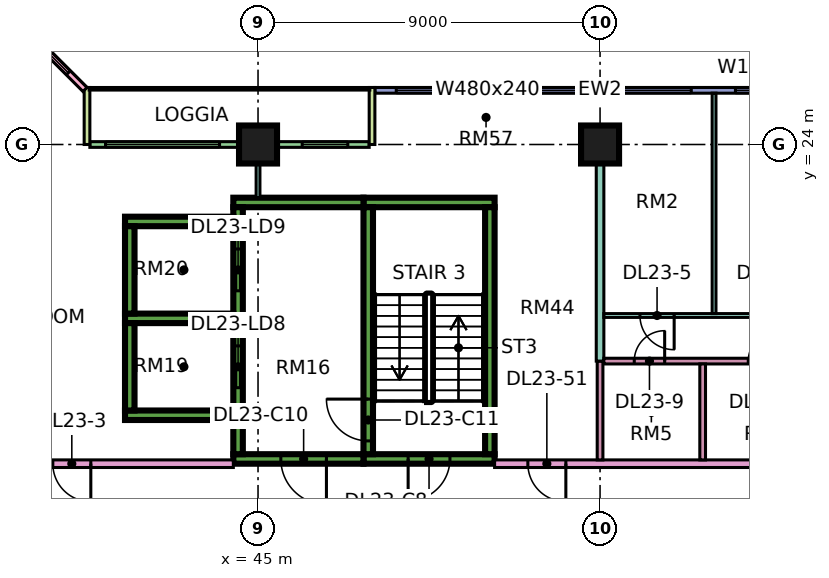
"""IFC4 building model, lengths in metres.
Left out: names, types, materials, properties, quantities, classifications, styles, units other than length and angle.
Written with IfcOpenShell. Run it as: python <this file> out.ifc"""

import sys

from ifc_helpers import new_model, si_unit, direction, frame, frame_2d, origin, origin_2d, place, context, subcontext, project, spatial, rectangle, extrude, element, fill, save


model = new_model("IFC4")
c1 = context("Model", 3, precision=1e-05, world=origin(), true_north=direction((0.0, 1.0)))
c2 = subcontext(c1, "Body", "Model", "MODEL_VIEW")
j1 = project(units=[si_unit("LENGTHUNIT", "METRE"), si_unit("PLANEANGLEUNIT", "RADIAN")], contexts=[c1])
p1 = place(None, origin())
s1 = spatial("IfcSite", under=j1, at=p1, CompositionType="ELEMENT")
p2 = place(p1, origin())
s2 = spatial("IfcBuilding", under=s1, at=p2, CompositionType="ELEMENT")
p3 = place(p2, frame((0.0, 0.0, 103.15)))
s3 = spatial("IfcBuildingStorey", under=s2, at=p3, CompositionType="ELEMENT", Elevation=103.15)
for number, where, z_axis, x_axis in (
    (1, (45.0, 24.0, 0.0), (0.0, 0.0, 1.0), (1.0, 0.0, 0.0)),
    (2, (54.0, 24.0, 0.0), (0.0, 0.0, 1.0), (1.0, 0.0, 0.0)),
):
    element("IfcColumn", number, at=place(p3, frame(where, z_axis=z_axis, x_axis=x_axis)), inside=s3, PredefinedType="COLUMN", context=c2, shape_type="SweptSolid", body=[
        extrude(rectangle(XDim=1.0, YDim=1.0, at=origin_2d()), origin(), (0.0, 0.0, 1.0), 3.75),
    ])
p4 = place(p3, frame((47.775, 15.725, 0.0), z_axis=(0.0, 0.0, 1.0), x_axis=(1.0, 0.0, 0.0)))
e3 = element("IfcWall", 3, at=p4, inside=s3, PredefinedType="SHEAR", context=c2, shape_type="SweptSolid", body=[
    extrude(rectangle(XDim=3.45, YDim=0.25, at=frame_2d((1.725, 0.0))), origin(), (0.0, 0.0, 1.0), 3.75),
])
p5 = place(p4, frame((1.175, 0.0, 0.0)))
e4 = element("IfcOpeningElement", 4, at=p5, cuts=e3, PredefinedType="OPENING", context=c2, shape_type="SweptSolid", body=[
    extrude(rectangle(XDim=1.1, YDim=2.2, at=frame_2d((0.55, 1.1))), frame((0.0, 0.135, 0.0), z_axis=(0.0, -1.0, 0.0), x_axis=(1.0, 0.0, 0.0)), (0.0, 0.0, 1.0), 0.27),
])
p6 = place(p3, frame((47.775, 22.475, 0.0), z_axis=(0.0, 0.0, 1.0), x_axis=(1.0, 0.0, 0.0)))
e5 = element("IfcWall", 5, at=p6, inside=s3, PredefinedType="SHEAR", context=c2, shape_type="SweptSolid", body=[
    extrude(rectangle(XDim=3.45, YDim=0.25, at=frame_2d((1.725, 0.0))), origin(), (0.0, 0.0, 1.0), 3.75),
])
p7 = place(p3, frame((47.9, 15.85, 0.0), z_axis=(0.0, 0.0, 1.0), x_axis=(0.0, 1.0, 0.0)))
e6 = element("IfcWall", 6, at=p7, inside=s3, PredefinedType="SHEAR", context=c2, shape_type="SweptSolid", body=[
    extrude(rectangle(XDim=6.5, YDim=0.25, at=frame_2d((3.25, 0.0))), origin(), (0.0, 0.0, 1.0), 3.75),
])
p8 = place(p7, frame((0.35, 0.0, 0.0)))
e7 = element("IfcOpeningElement", 7, at=p8, cuts=e6, PredefinedType="OPENING", context=c2, shape_type="SweptSolid", body=[
    extrude(rectangle(XDim=1.1, YDim=2.2, at=frame_2d((0.55, 1.1))), frame((0.0, 0.135, 0.0), z_axis=(0.0, -1.0, 0.0), x_axis=(1.0, 0.0, 0.0)), (0.0, 0.0, 1.0), 0.27),
])
p9 = place(p3, frame((51.1, 15.85, 0.0), z_axis=(0.0, 0.0, 1.0), x_axis=(0.0, 1.0, 0.0)))
e8 = element("IfcWall", 8, at=p9, inside=s3, PredefinedType="SHEAR", context=c2, shape_type="SweptSolid", body=[
    extrude(rectangle(XDim=6.5, YDim=0.25, at=frame_2d((3.25, 0.0))), origin(), (0.0, 0.0, 1.0), 3.75),
])
p10 = place(p3, frame((44.35, 15.725, 0.0), z_axis=(0.0, 0.0, 1.0), x_axis=(1.0, 0.0, 0.0)))
e9 = element("IfcWall", 9, at=p10, inside=s3, PredefinedType="SHEAR", context=c2, shape_type="SweptSolid", body=[
    extrude(rectangle(XDim=3.425, YDim=0.25, at=frame_2d((1.712, 0.0))), origin(), (0.0, 0.0, 1.0), 3.75),
])
p11 = place(p10, frame((1.25, 0.0, 0.0)))
e10 = element("IfcOpeningElement", 10, at=p11, cuts=e9, PredefinedType="OPENING", context=c2, shape_type="SweptSolid", body=[
    extrude(rectangle(XDim=1.2, YDim=2.2, at=frame_2d((0.6, 1.1))), frame((0.0, 0.135, 0.0), z_axis=(0.0, -1.0, 0.0), x_axis=(1.0, 0.0, 0.0)), (0.0, 0.0, 1.0), 0.27),
])
p12 = place(p3, frame((44.35, 22.475, 0.0), z_axis=(0.0, 0.0, 1.0), x_axis=(1.0, 0.0, 0.0)))
e11 = element("IfcWall", 11, at=p12, inside=s3, PredefinedType="SHEAR", context=c2, shape_type="SweptSolid", body=[
    extrude(rectangle(XDim=3.425, YDim=0.25, at=frame_2d((1.712, 0.0))), origin(), (0.0, 0.0, 1.0), 3.75),
])
p13 = place(p3, frame((44.475, 15.85, 0.0), z_axis=(0.0, 0.0, 1.0), x_axis=(0.0, 1.0, 0.0)))
e12 = element("IfcWall", 12, at=p13, inside=s3, PredefinedType="SHEAR", context=c2, shape_type="SweptSolid", body=[
    extrude(rectangle(XDim=6.5, YDim=0.25, at=frame_2d((3.25, 0.0))), origin(), (0.0, 0.0, 1.0), 3.75),
])
p14 = place(p13, frame((1.75, 0.0, 0.0)))
e13 = element("IfcOpeningElement", 13, at=p14, cuts=e12, PredefinedType="OPENING", context=c2, shape_type="SweptSolid", body=[
    extrude(rectangle(XDim=1.1, YDim=2.2, at=frame_2d((0.55, 1.1))), frame((0.0, 0.135, 0.0), z_axis=(0.0, -1.0, 0.0), x_axis=(1.0, 0.0, 0.0)), (0.0, 0.0, 1.0), 0.27),
])
p15 = place(p13, frame((4.3, 0.0, 0.0)))
e14 = element("IfcOpeningElement", 14, at=p15, cuts=e12, PredefinedType="OPENING", context=c2, shape_type="SweptSolid", body=[
    extrude(rectangle(XDim=1.1, YDim=2.2, at=frame_2d((0.55, 1.1))), frame((0.0, 0.135, 0.0), z_axis=(0.0, -1.0, 0.0), x_axis=(1.0, 0.0, 0.0)), (0.0, 0.0, 1.0), 0.27),
])
for number, where, z_axis, x_axis in (
    (15, (41.5, 16.875, 0.0), (0.0, 0.0, 1.0), (1.0, 0.0, 0.0)),
    (16, (41.5, 19.425, 0.0), (0.0, 0.0, 1.0), (1.0, 0.0, 0.0)),
    (17, (41.5, 21.975, 0.0), (0.0, 0.0, 1.0), (1.0, 0.0, 0.0)),
):
    element("IfcWall", number, at=place(p3, frame(where, z_axis=z_axis, x_axis=x_axis)), inside=s3, PredefinedType="SHEAR", context=c2, shape_type="SweptSolid", body=[
        extrude(rectangle(XDim=2.85, YDim=0.25, at=frame_2d((1.425, 0.0))), origin(), (0.0, 0.0, 1.0), 3.75),
    ])
for number, where, z_axis, x_axis in (
    (18, (41.625, 17.0, 0.0), (0.0, 0.0, 1.0), (0.0, 1.0, 0.0)),
    (19, (41.625, 19.55, 0.0), (0.0, 0.0, 1.0), (0.0, 1.0, 0.0)),
):
    element("IfcWall", number, at=place(p3, frame(where, z_axis=z_axis, x_axis=x_axis)), inside=s3, PredefinedType="SHEAR", context=c2, shape_type="SweptSolid", body=[
        extrude(rectangle(XDim=2.3, YDim=0.25, at=frame_2d((1.15, 0.0))), origin(), (0.0, 0.0, 1.0), 3.75),
    ])
p16 = place(p3, frame((59.925, 25.425, 0.0), z_axis=(0.0, 0.0, 1.0), x_axis=(-1.0, 0.0, 0.0)))
e20 = element("IfcWall", 20, at=p16, inside=s3, PredefinedType="SOLIDWALL", context=c2, shape_type="SweptSolid", body=[
    extrude(rectangle(XDim=11.85, YDim=0.15, at=frame_2d((5.925, 0.0))), origin(), (0.0, 0.0, 1.0), 3.35),
])
p17 = place(p16, frame((0.562, 0.0, 0.45)))
e21 = element("IfcOpeningElement", 21, at=p17, cuts=e20, PredefinedType="OPENING", context=c2, shape_type="SweptSolid", body=[
    extrude(rectangle(XDim=1.8, YDim=2.4, at=frame_2d((0.9, 1.2))), frame((0.0, 0.085, 0.0), z_axis=(0.0, -1.0, 0.0), x_axis=(1.0, 0.0, 0.0)), (0.0, 0.0, 1.0), 0.17),
])
p18 = place(p16, frame((3.525, 0.0, 0.45)))
e22 = element("IfcOpeningElement", 22, at=p18, cuts=e20, PredefinedType="OPENING", context=c2, shape_type="SweptSolid", body=[
    extrude(rectangle(XDim=1.8, YDim=2.4, at=frame_2d((0.9, 1.2))), frame((0.0, 0.085, 0.0), z_axis=(0.0, -1.0, 0.0), x_axis=(1.0, 0.0, 0.0)), (0.0, 0.0, 1.0), 0.17),
])
p19 = place(p16, frame((6.488, 0.0, 0.45)))
e23 = element("IfcOpeningElement", 23, at=p19, cuts=e20, PredefinedType="OPENING", context=c2, shape_type="SweptSolid", body=[
    extrude(rectangle(XDim=4.8, YDim=2.4, at=frame_2d((2.4, 1.2))), frame((0.0, 0.085, 0.0), z_axis=(0.0, -1.0, 0.0), x_axis=(1.0, 0.0, 0.0)), (0.0, 0.0, 1.0), 0.17),
])
p20 = place(p3, frame((47.925, 24.0, 0.0), z_axis=(0.0, 0.0, 1.0), x_axis=(-1.0, 0.0, 0.0)))
e24 = element("IfcWall", 24, at=p20, inside=s3, PredefinedType="SOLIDWALL", context=c2, shape_type="SweptSolid", body=[
    extrude(rectangle(XDim=7.35, YDim=0.15, at=frame_2d((3.675, 0.0))), origin(), (0.0, 0.0, 1.0), 3.35),
])
p21 = place(p20, frame((0.562, 0.0, 0.45)))
e25 = element("IfcOpeningElement", 25, at=p21, cuts=e24, PredefinedType="OPENING", context=c2, shape_type="SweptSolid", body=[
    extrude(rectangle(XDim=1.2, YDim=2.4, at=frame_2d((0.6, 1.2))), frame((0.0, 0.085, 0.0), z_axis=(0.0, -1.0, 0.0), x_axis=(1.0, 0.0, 0.0)), (0.0, 0.0, 1.0), 0.17),
])
p22 = place(p20, frame((3.938, 0.0, 0.45)))
e26 = element("IfcOpeningElement", 26, at=p22, cuts=e24, PredefinedType="OPENING", context=c2, shape_type="SweptSolid", body=[
    extrude(rectangle(XDim=3.0, YDim=2.4, at=frame_2d((1.5, 1.2))), frame((0.0, 0.085, 0.0), z_axis=(0.0, -1.0, 0.0), x_axis=(1.0, 0.0, 0.0)), (0.0, 0.0, 1.0), 0.17),
])
for number, where, z_axis, x_axis in (
    (27, (48.0, 25.5, 0.0), (0.0, 0.0, 1.0), (0.0, -1.0, 0.0)),
    (28, (40.5, 25.5, 0.0), (0.0, 0.0, 1.0), (0.0, -1.0, 0.0)),
):
    element("IfcWall", number, at=place(p3, frame(where, z_axis=z_axis, x_axis=x_axis)), inside=s3, PredefinedType="SOLIDWALL", context=c2, shape_type="SweptSolid", body=[
        extrude(rectangle(XDim=1.5, YDim=0.15, at=frame_2d((0.75, 0.0))), origin(), (0.0, 0.0, 1.0), 3.35),
    ])
p23 = place(p3, frame((40.447, 25.447, 0.0), z_axis=(0.0, 0.0, 1.0), x_axis=(-0.707106781187, 0.707106781187, 0.0)))
e29 = element("IfcWall", 29, at=p23, inside=s3, PredefinedType="SOLIDWALL", context=c2, shape_type="SweptSolid", body=[
    extrude(rectangle(XDim=4.243, YDim=0.15, at=frame_2d((2.121, 0.0))), origin(), (0.0, 0.0, 1.0), 3.35),
])
p24 = place(p23, frame((0.621, 0.0, 0.45)))
e30 = element("IfcOpeningElement", 30, at=p24, cuts=e29, PredefinedType="OPENING", context=c2, shape_type="SweptSolid", body=[
    extrude(rectangle(XDim=3.0, YDim=2.4, at=frame_2d((1.5, 1.2))), frame((0.0, 0.085, 0.0), z_axis=(0.0, -1.0, 0.0), x_axis=(1.0, 0.0, 0.0)), (0.0, 0.0, 1.0), 0.17),
])
p25 = place(p3, frame((34.0, 15.6, 0.0), z_axis=(0.0, 0.0, 1.0), x_axis=(1.0, 0.0, 0.0)))
e31 = element("IfcWall", 31, at=p25, inside=s3, PredefinedType="PARTITIONING", context=c2, shape_type="SweptSolid", body=[
    extrude(rectangle(XDim=10.35, YDim=0.2, at=frame_2d((5.175, 0.0))), origin(), (0.0, 0.0, 1.0), 3.35),
])
p26 = place(p25, frame((5.6, 0.0, 0.0)))
e32 = element("IfcOpeningElement", 32, at=p26, cuts=e31, PredefinedType="OPENING", context=c2, shape_type="SweptSolid", body=[
    extrude(rectangle(XDim=1.0, YDim=2.1, at=frame_2d((0.5, 1.05))), frame((0.0, 0.11, 0.0), z_axis=(0.0, -1.0, 0.0), x_axis=(1.0, 0.0, 0.0)), (0.0, 0.0, 1.0), 0.22),
])
p27 = place(p25, frame((0.45, 0.0, 0.0)))
e33 = element("IfcOpeningElement", 33, at=p27, cuts=e31, PredefinedType="OPENING", context=c2, shape_type="SweptSolid", body=[
    extrude(rectangle(XDim=1.2, YDim=2.1, at=frame_2d((0.6, 1.05))), frame((0.0, 0.11, 0.0), z_axis=(0.0, -1.0, 0.0), x_axis=(1.0, 0.0, 0.0)), (0.0, 0.0, 1.0), 0.22),
])
p28 = place(p3, frame((45.0, 22.6, 0.0), z_axis=(0.0, 0.0, 1.0), x_axis=(0.0, 1.0, 0.0)))
e34 = element("IfcWall", 34, at=p28, inside=s3, PredefinedType="PARTITIONING", context=c2, shape_type="SweptSolid", body=[
    extrude(rectangle(XDim=1.326, YDim=0.1, at=frame_2d((0.663, 0.0))), origin(), (0.0, 0.0, 1.0), 3.35),
])
p29 = place(p3, frame((51.225, 15.6, 0.0), z_axis=(0.0, 0.0, 1.0), x_axis=(1.0, 0.0, 0.0)))
e35 = element("IfcWall", 35, at=p29, inside=s3, PredefinedType="PARTITIONING", context=c2, shape_type="SweptSolid", body=[
    extrude(rectangle(XDim=20.701, YDim=0.2, at=frame_2d((10.351, 0.0))), origin(), (0.0, 0.0, 1.0), 3.35),
])
p30 = place(p29, frame((18.425, 0.0, 0.0)))
e36 = element("IfcOpeningElement", 36, at=p30, cuts=e35, PredefinedType="OPENING", context=c2, shape_type="SweptSolid", body=[
    extrude(rectangle(XDim=1.0, YDim=2.1, at=frame_2d((0.5, 1.05))), frame((0.0, 0.11, 0.0), z_axis=(0.0, -1.0, 0.0), x_axis=(1.0, 0.0, 0.0)), (0.0, 0.0, 1.0), 0.22),
])
p31 = place(p29, frame((0.875, 0.0, 0.0)))
e37 = element("IfcOpeningElement", 37, at=p31, cuts=e35, PredefinedType="OPENING", context=c2, shape_type="SweptSolid", body=[
    extrude(rectangle(XDim=1.0, YDim=2.1, at=frame_2d((0.5, 1.05))), frame((0.0, 0.11, 0.0), z_axis=(0.0, -1.0, 0.0), x_axis=(1.0, 0.0, 0.0)), (0.0, 0.0, 1.0), 0.22),
])
p32 = place(p3, frame((54.0, 15.7, 0.0), z_axis=(0.0, 0.0, 1.0), x_axis=(0.0, 1.0, 0.0)))
e38 = element("IfcWall", 38, at=p32, inside=s3, PredefinedType="PARTITIONING", context=c2, shape_type="SweptSolid", body=[
    extrude(rectangle(XDim=2.6, YDim=0.15, at=frame_2d((1.3, 0.0))), origin(), (0.0, 0.0, 1.0), 3.35),
])
p33 = place(p3, frame((54.0, 18.3, 0.0), z_axis=(0.0, 0.0, 1.0), x_axis=(0.0, 1.0, 0.0)))
e39 = element("IfcWall", 39, at=p33, inside=s3, PredefinedType="PARTITIONING", context=c2, shape_type="SweptSolid", body=[
    extrude(rectangle(XDim=5.7, YDim=0.2, at=frame_2d((2.85, 0.0))), origin(), (0.0, 0.0, 1.0), 3.35),
])
p34 = place(p3, frame((54.1, 18.3, 0.0), z_axis=(0.0, 0.0, 1.0), x_axis=(1.0, 0.0, 0.0)))
e40 = element("IfcWall", 40, at=p34, inside=s3, PredefinedType="PARTITIONING", context=c2, shape_type="SweptSolid", body=[
    extrude(rectangle(XDim=14.375, YDim=0.15, at=frame_2d((7.188, 0.0))), origin(), (0.0, 0.0, 1.0), 3.35),
])
p35 = place(p34, frame((3.8, 0.0, 0.0)))
e41 = element("IfcOpeningElement", 41, at=p35, cuts=e40, PredefinedType="OPENING", context=c2, shape_type="SweptSolid", body=[
    extrude(rectangle(XDim=0.8, YDim=2.1, at=frame_2d((0.4, 1.05))), frame((0.0, 0.085, 0.0), z_axis=(0.0, -1.0, 0.0), x_axis=(1.0, 0.0, 0.0)), (0.0, 0.0, 1.0), 0.17),
])
p36 = place(p34, frame((10.4, 0.0, 0.0)))
e42 = element("IfcOpeningElement", 42, at=p36, cuts=e40, PredefinedType="OPENING", context=c2, shape_type="SweptSolid", body=[
    extrude(rectangle(XDim=0.9, YDim=2.1, at=frame_2d((0.45, 1.05))), frame((0.0, 0.085, 0.0), z_axis=(0.0, -1.0, 0.0), x_axis=(1.0, 0.0, 0.0)), (0.0, 0.0, 1.0), 0.17),
])
p37 = place(p34, frame((0.8, 0.0, 0.0)))
e43 = element("IfcOpeningElement", 43, at=p37, cuts=e40, PredefinedType="OPENING", context=c2, shape_type="SweptSolid", body=[
    extrude(rectangle(XDim=0.8, YDim=2.1, at=frame_2d((0.4, 1.05))), frame((0.0, 0.085, 0.0), z_axis=(0.0, -1.0, 0.0), x_axis=(1.0, 0.0, 0.0)), (0.0, 0.0, 1.0), 0.17),
])
p38 = place(p34, frame((7.1, 0.0, 0.0)))
e44 = element("IfcOpeningElement", 44, at=p38, cuts=e40, PredefinedType="OPENING", context=c2, shape_type="SweptSolid", body=[
    extrude(rectangle(XDim=0.8, YDim=2.1, at=frame_2d((0.4, 1.05))), frame((0.0, 0.085, 0.0), z_axis=(0.0, -1.0, 0.0), x_axis=(1.0, 0.0, 0.0)), (0.0, 0.0, 1.0), 0.17),
])
p39 = place(p3, frame((54.1, 19.5, 0.0), z_axis=(0.0, 0.0, 1.0), x_axis=(1.0, 0.0, 0.0)))
e45 = element("IfcWall", 45, at=p39, inside=s3, PredefinedType="PARTITIONING", context=c2, shape_type="SweptSolid", body=[
    extrude(rectangle(XDim=5.95, YDim=0.1, at=frame_2d((2.975, 0.0))), origin(), (0.0, 0.0, 1.0), 3.35),
])
p40 = place(p39, frame((0.95, 0.0, 0.0)))
e46 = element("IfcOpeningElement", 46, at=p40, cuts=e45, PredefinedType="OPENING", context=c2, shape_type="SweptSolid", body=[
    extrude(rectangle(XDim=0.9, YDim=2.1, at=frame_2d((0.45, 1.05))), frame((0.0, 0.06, 0.0), z_axis=(0.0, -1.0, 0.0), x_axis=(1.0, 0.0, 0.0)), (0.0, 0.0, 1.0), 0.12),
])
p41 = place(p39, frame((3.95, 0.0, 0.0)))
e47 = element("IfcOpeningElement", 47, at=p41, cuts=e45, PredefinedType="OPENING", context=c2, shape_type="SweptSolid", body=[
    extrude(rectangle(XDim=0.9, YDim=2.1, at=frame_2d((0.45, 1.05))), frame((0.0, 0.06, 0.0), z_axis=(0.0, -1.0, 0.0), x_axis=(1.0, 0.0, 0.0)), (0.0, 0.0, 1.0), 0.12),
])
p42 = place(p3, frame((56.7, 15.7, 0.0), z_axis=(0.0, 0.0, 1.0), x_axis=(0.0, 1.0, 0.0)))
e48 = element("IfcWall", 48, at=p42, inside=s3, PredefinedType="PARTITIONING", context=c2, shape_type="SweptSolid", body=[
    extrude(rectangle(XDim=2.525, YDim=0.15, at=frame_2d((1.263, 0.0))), origin(), (0.0, 0.0, 1.0), 3.35),
])
p43 = place(p3, frame((57.0, 19.55, 0.0), z_axis=(0.0, 0.0, 1.0), x_axis=(0.0, 1.0, 0.0)))
e49 = element("IfcWall", 49, at=p43, inside=s3, PredefinedType="PARTITIONING", context=c2, shape_type="SweptSolid", body=[
    extrude(rectangle(XDim=5.801, YDim=0.1, at=frame_2d((2.9, 0.0))), origin(), (0.0, 0.0, 1.0), 3.35),
])
p44 = place(p17, origin())
e50 = element("IfcWindow", 50, at=p44, inside=s3, PartitioningType="SINGLE_PANEL", PredefinedType="WINDOW", context=c2, shape_type="SweptSolid", body=[
    extrude(rectangle(XDim=1.8, YDim=2.4, at=frame_2d((0.9, 1.2))), frame((0.0, 0.03, 0.0), z_axis=(0.0, -1.0, 0.0), x_axis=(1.0, 0.0, 0.0)), (0.0, 0.0, 1.0), 0.06),
])
fill(e21, e50)
p45 = place(p18, origin())
e51 = element("IfcWindow", 51, at=p45, inside=s3, PartitioningType="SINGLE_PANEL", PredefinedType="WINDOW", context=c2, shape_type="SweptSolid", body=[
    extrude(rectangle(XDim=1.8, YDim=2.4, at=frame_2d((0.9, 1.2))), frame((0.0, 0.03, 0.0), z_axis=(0.0, -1.0, 0.0), x_axis=(1.0, 0.0, 0.0)), (0.0, 0.0, 1.0), 0.06),
])
fill(e22, e51)
p46 = place(p19, origin())
e52 = element("IfcWindow", 52, at=p46, inside=s3, PartitioningType="SINGLE_PANEL", PredefinedType="WINDOW", context=c2, shape_type="SweptSolid", body=[
    extrude(rectangle(XDim=4.8, YDim=2.4, at=frame_2d((2.4, 1.2))), frame((0.0, 0.03, 0.0), z_axis=(0.0, -1.0, 0.0), x_axis=(1.0, 0.0, 0.0)), (0.0, 0.0, 1.0), 0.06),
])
fill(e23, e52)
p47 = place(p21, origin())
e53 = element("IfcWindow", 53, at=p47, inside=s3, PartitioningType="SINGLE_PANEL", PredefinedType="WINDOW", context=c2, shape_type="SweptSolid", body=[
    extrude(rectangle(XDim=1.2, YDim=2.4, at=frame_2d((0.6, 1.2))), frame((0.0, 0.03, 0.0), z_axis=(0.0, -1.0, 0.0), x_axis=(1.0, 0.0, 0.0)), (0.0, 0.0, 1.0), 0.06),
])
fill(e25, e53)
p48 = place(p22, origin())
e54 = element("IfcWindow", 54, at=p48, inside=s3, PartitioningType="SINGLE_PANEL", PredefinedType="WINDOW", context=c2, shape_type="SweptSolid", body=[
    extrude(rectangle(XDim=3.0, YDim=2.4, at=frame_2d((1.5, 1.2))), frame((0.0, 0.03, 0.0), z_axis=(0.0, -1.0, 0.0), x_axis=(1.0, 0.0, 0.0)), (0.0, 0.0, 1.0), 0.06),
])
fill(e26, e54)
p49 = place(p24, origin())
e55 = element("IfcWindow", 55, at=p49, inside=s3, PartitioningType="SINGLE_PANEL", PredefinedType="WINDOW", context=c2, shape_type="SweptSolid", body=[
    extrude(rectangle(XDim=3.0, YDim=2.4, at=frame_2d((1.5, 1.2))), frame((0.0, 0.03, 0.0), z_axis=(0.0, -1.0, 0.0), x_axis=(1.0, 0.0, 0.0)), (0.0, 0.0, 1.0), 0.06),
])
fill(e30, e55)
p50 = place(p5, frame((1.1, 0.0, 0.0), z_axis=(0.0, 0.0, 1.0), x_axis=(-1.0, 0.0, 0.0)))
e56 = element("IfcDoor", 56, at=p50, inside=s3, OperationType="SINGLE_SWING_LEFT", PredefinedType="DOOR", context=c2, shape_type="SweptSolid", body=[
    extrude(rectangle(XDim=1.1, YDim=2.2, at=frame_2d((0.55, 1.1))), frame((0.0, 0.025, 0.0), z_axis=(0.0, -1.0, 0.0), x_axis=(1.0, 0.0, 0.0)), (0.0, 0.0, 1.0), 0.05),
])
fill(e4, e56)
p51 = place(p11, origin())
e57 = element("IfcDoor", 57, at=p51, inside=s3, OperationType="SINGLE_SWING_RIGHT", PredefinedType="DOOR", context=c2, shape_type="SweptSolid", body=[
    extrude(rectangle(XDim=1.2, YDim=2.2, at=frame_2d((0.6, 1.1))), frame((0.0, 0.025, 0.0), z_axis=(0.0, -1.0, 0.0), x_axis=(1.0, 0.0, 0.0)), (0.0, 0.0, 1.0), 0.05),
])
fill(e10, e57)
p52 = place(p8, frame((1.1, 0.0, 0.0), z_axis=(0.0, 0.0, 1.0), x_axis=(-1.0, 0.0, 0.0)))
e58 = element("IfcDoor", 58, at=p52, inside=s3, OperationType="SINGLE_SWING_RIGHT", PredefinedType="DOOR", context=c2, shape_type="SweptSolid", body=[
    extrude(rectangle(XDim=1.1, YDim=2.2, at=frame_2d((0.55, 1.1))), frame((0.0, 0.025, 0.0), z_axis=(0.0, -1.0, 0.0), x_axis=(1.0, 0.0, 0.0)), (0.0, 0.0, 1.0), 0.05),
])
fill(e7, e58)
p53 = place(p14, origin())
e59 = element("IfcDoor", 59, at=p53, inside=s3, OperationType="DOUBLE_DOOR_SLIDING", PredefinedType="DOOR", context=c2, shape_type="SweptSolid", body=[
    extrude(rectangle(XDim=1.1, YDim=2.2, at=frame_2d((0.55, 1.1))), frame((0.0, 0.025, 0.0), z_axis=(0.0, -1.0, 0.0), x_axis=(1.0, 0.0, 0.0)), (0.0, 0.0, 1.0), 0.05),
])
fill(e13, e59)
p54 = place(p15, origin())
e60 = element("IfcDoor", 60, at=p54, inside=s3, OperationType="DOUBLE_DOOR_SLIDING", PredefinedType="DOOR", context=c2, shape_type="SweptSolid", body=[
    extrude(rectangle(XDim=1.1, YDim=2.2, at=frame_2d((0.55, 1.1))), frame((0.0, 0.025, 0.0), z_axis=(0.0, -1.0, 0.0), x_axis=(1.0, 0.0, 0.0)), (0.0, 0.0, 1.0), 0.05),
])
fill(e14, e60)
p55 = place(p26, origin())
e61 = element("IfcDoor", 61, at=p55, inside=s3, OperationType="SINGLE_SWING_RIGHT", PredefinedType="DOOR", context=c2, shape_type="SweptSolid", body=[
    extrude(rectangle(XDim=1.0, YDim=2.1, at=frame_2d((0.5, 1.05))), frame((0.0, 0.025, 0.0), z_axis=(0.0, -1.0, 0.0), x_axis=(1.0, 0.0, 0.0)), (0.0, 0.0, 1.0), 0.05),
])
fill(e32, e61)
p56 = place(p35, frame((0.8, 0.0, 0.0), z_axis=(0.0, 0.0, 1.0), x_axis=(-1.0, 0.0, 0.0)))
e62 = element("IfcDoor", 62, at=p56, inside=s3, OperationType="SINGLE_SWING_RIGHT", PredefinedType="DOOR", context=c2, shape_type="SweptSolid", body=[
    extrude(rectangle(XDim=0.8, YDim=2.1, at=frame_2d((0.4, 1.05))), frame((0.0, 0.025, 0.0), z_axis=(0.0, -1.0, 0.0), x_axis=(1.0, 0.0, 0.0)), (0.0, 0.0, 1.0), 0.05),
])
fill(e41, e62)
p57 = place(p40, origin())
e63 = element("IfcDoor", 63, at=p57, inside=s3, OperationType="SINGLE_SWING_RIGHT", PredefinedType="DOOR", context=c2, shape_type="SweptSolid", body=[
    extrude(rectangle(XDim=0.9, YDim=2.1, at=frame_2d((0.45, 1.05))), frame((0.0, 0.025, 0.0), z_axis=(0.0, -1.0, 0.0), x_axis=(1.0, 0.0, 0.0)), (0.0, 0.0, 1.0), 0.05),
])
fill(e46, e63)
p58 = place(p37, frame((0.8, 0.0, 0.0), z_axis=(0.0, 0.0, 1.0), x_axis=(-1.0, 0.0, 0.0)))
e64 = element("IfcDoor", 64, at=p58, inside=s3, OperationType="SINGLE_SWING_RIGHT", PredefinedType="DOOR", context=c2, shape_type="SweptSolid", body=[
    extrude(rectangle(XDim=0.8, YDim=2.1, at=frame_2d((0.4, 1.05))), frame((0.0, 0.025, 0.0), z_axis=(0.0, -1.0, 0.0), x_axis=(1.0, 0.0, 0.0)), (0.0, 0.0, 1.0), 0.05),
])
fill(e43, e64)
p59 = place(p31, origin())
e65 = element("IfcDoor", 65, at=p59, inside=s3, OperationType="SINGLE_SWING_RIGHT", PredefinedType="DOOR", context=c2, shape_type="SweptSolid", body=[
    extrude(rectangle(XDim=1.0, YDim=2.1, at=frame_2d((0.5, 1.05))), frame((0.0, 0.025, 0.0), z_axis=(0.0, -1.0, 0.0), x_axis=(1.0, 0.0, 0.0)), (0.0, 0.0, 1.0), 0.05),
])
fill(e37, e65)
save(model, sys.argv[1])
